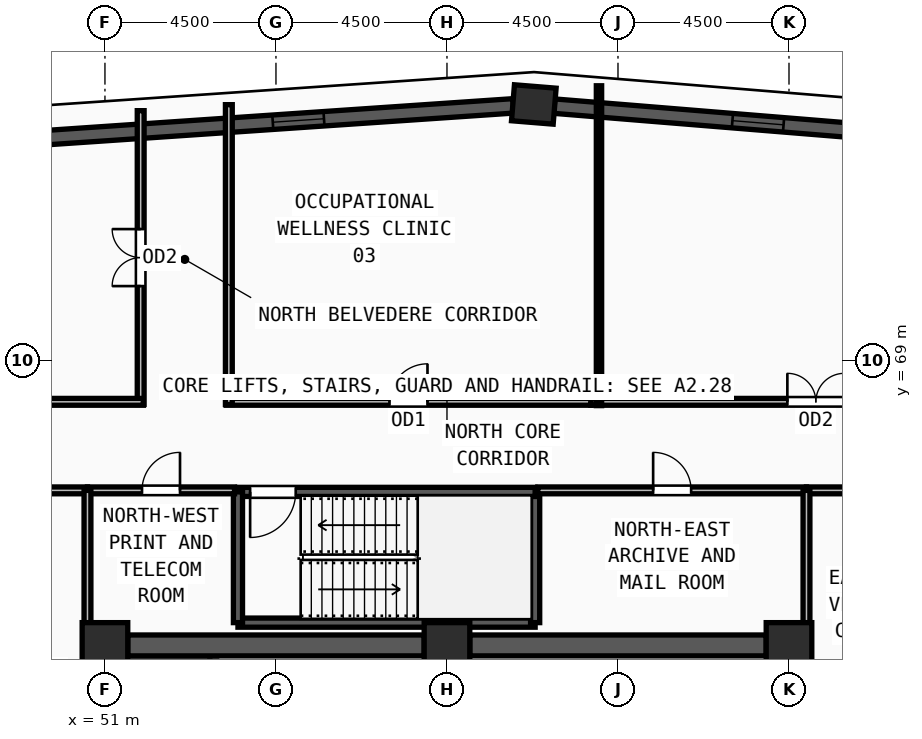
"""IFC4 building model, lengths in metres.
Left out: names, types, materials, properties, quantities, classifications, styles, units other than length and angle.
Written with IfcOpenShell. Run it as: python <this file> out.ifc"""

import sys

from ifc_helpers import new_model, si_unit, direction, frame, frame_2d, origin, origin_2d, place, context, subcontext, project, spatial, rectangle, extrude, source, transform, mapped, element, fill, save


model = new_model("IFC4")
c1 = context("Model", 3, precision=1e-05, world=origin(), true_north=direction((0.0, 1.0)))
c2 = subcontext(c1, "Body", "Model", "MODEL_VIEW")
j1 = project(units=[si_unit("LENGTHUNIT", "METRE"), si_unit("PLANEANGLEUNIT", "RADIAN")], contexts=[c1])
p1 = place(None, origin())
s1 = spatial("IfcSite", under=j1, at=p1, CompositionType="ELEMENT")
p2 = place(p1, origin())
s2 = spatial("IfcBuilding", under=s1, at=p2, CompositionType="ELEMENT")
p3 = place(p2, frame((0.0, 0.0, 320.25)))
s3 = spatial("IfcBuildingStorey", under=s2, at=p3, CompositionType="ELEMENT", Elevation=320.25)
m1 = source(origin(), c2, "Body", "SweptSolid", [
    extrude(rectangle(XDim=1.2, YDim=1.2, at=origin_2d()), origin(), (0.0, 0.0, 1.0), 3.75),
])
for number, where, z_axis, x_axis in (
    (1, (69.0, 61.5, 0.0), (0.0, 0.0, 1.0), (1.0, 0.0, 0.0)),
    (2, (60.0, 61.5, 0.0), (0.0, 0.0, 1.0), (1.0, 0.0, 0.0)),
    (3, (51.0, 61.5, 0.0), (0.0, 0.0, 1.0), (1.0, 0.0, 0.0)),
):
    element("IfcColumn", number, at=place(p3, frame(where, z_axis=z_axis, x_axis=x_axis)), inside=s3, PredefinedType="COLUMN", context=c2, shape_type="MappedRepresentation", body=[
        mapped(m1, transform((0.0, 0.0, 0.0), x_axis=(1.0, 0.0, 0.0), y_axis=(0.0, 1.0, 0.0), z_axis=(0.0, 0.0, 1.0), scale=1.0)),
    ])
m2 = source(origin(), c2, "Body", "SweptSolid", [
    extrude(rectangle(XDim=1.1, YDim=0.95, at=origin_2d()), origin(), (0.0, 0.0, 1.0), 3.75),
])
p4 = place(p3, frame((62.285, 75.734, 0.0), z_axis=(0.0, 0.0, 1.0), x_axis=(-0.996694347809, 0.081242704565, 0.0)))
e4 = element("IfcColumn", 4, at=p4, inside=s3, PredefinedType="COLUMN", context=c2, shape_type="MappedRepresentation", body=[
    mapped(m2, transform((0.0, 0.0, 0.0), x_axis=(1.0, 0.0, 0.0), y_axis=(0.0, 1.0, 0.0), z_axis=(0.0, 0.0, 1.0), scale=1.0)),
])
p5 = place(p3, frame((84.267, 73.943, 0.0), z_axis=(0.0, 0.0, 1.0), x_axis=(-0.996698591672, 0.081190623594, 0.0)))
e5 = element("IfcWall", 5, at=p5, inside=s3, PredefinedType="SOLIDWALL", context=c2, shape_type="SweptSolid", body=[
    extrude(rectangle(XDim=21.515, YDim=0.38, at=frame_2d((10.758, 0.0))), origin(), (0.0, 0.0, 1.0), 3.47),
])
m3 = source(origin(), c2, "Body", "SweptSolid", [
    extrude(rectangle(XDim=1.35, YDim=1.85, at=frame_2d((0.675, 0.925))), frame((0.0, 0.2, 0.0), z_axis=(0.0, -1.0, 0.0), x_axis=(1.0, 0.0, 0.0)), (0.0, 0.0, 1.0), 0.4),
])
p6 = place(p5, frame((4.704, 0.0, 0.55)))
e6 = element("IfcOpeningElement", 6, at=p6, cuts=e5, PredefinedType="OPENING", context=c2, shape_type="MappedRepresentation", body=[
    mapped(m3, transform((0.0, 0.0, 0.0), x_axis=(1.0, 0.0, 0.0), y_axis=(0.0, 1.0, 0.0), z_axis=(0.0, 0.0, 1.0), scale=1.0)),
])
p7 = place(p5, frame((10.083, 0.0, 0.55)))
e7 = element("IfcOpeningElement", 7, at=p7, cuts=e5, PredefinedType="OPENING", context=c2, shape_type="MappedRepresentation", body=[
    mapped(m3, transform((0.0, 0.0, 0.0), x_axis=(1.0, 0.0, 0.0), y_axis=(0.0, 1.0, 0.0), z_axis=(0.0, 0.0, 1.0), scale=1.0)),
])
p8 = place(p5, frame((15.461, 0.0, 0.55)))
e8 = element("IfcOpeningElement", 8, at=p8, cuts=e5, PredefinedType="OPENING", context=c2, shape_type="MappedRepresentation", body=[
    mapped(m3, transform((0.0, 0.0, 0.0), x_axis=(1.0, 0.0, 0.0), y_axis=(0.0, 1.0, 0.0), z_axis=(0.0, 0.0, 1.0), scale=1.0)),
])
p9 = place(p3, frame((61.746, 75.697, 0.0), z_axis=(0.0, 0.0, 1.0), x_axis=(-0.997695779362, -0.067846384155, 0.0)))
e9 = element("IfcWall", 9, at=p9, inside=s3, PredefinedType="SOLIDWALL", context=c2, shape_type="SweptSolid", body=[
    extrude(rectangle(XDim=26.074, YDim=0.38, at=frame_2d((13.037, 0.0))), origin(), (0.0, 0.0, 1.0), 3.47),
])
p10 = place(p9, frame((4.994, 0.0, 0.55)))
e10 = element("IfcOpeningElement", 10, at=p10, cuts=e9, PredefinedType="OPENING", context=c2, shape_type="MappedRepresentation", body=[
    mapped(m3, transform((0.0, 0.0, 0.0), x_axis=(1.0, 0.0, 0.0), y_axis=(0.0, 1.0, 0.0), z_axis=(0.0, 0.0, 1.0), scale=1.0)),
])
p11 = place(p9, frame((12.362, 0.0, 0.55)))
e11 = element("IfcOpeningElement", 11, at=p11, cuts=e9, PredefinedType="OPENING", context=c2, shape_type="MappedRepresentation", body=[
    mapped(m3, transform((0.0, 0.0, 0.0), x_axis=(1.0, 0.0, 0.0), y_axis=(0.0, 1.0, 0.0), z_axis=(0.0, 0.0, 1.0), scale=1.0)),
])
p12 = place(p9, frame((18.881, 0.0, 0.55)))
e12 = element("IfcOpeningElement", 12, at=p12, cuts=e9, PredefinedType="OPENING", context=c2, shape_type="MappedRepresentation", body=[
    mapped(m3, transform((0.0, 0.0, 0.0), x_axis=(1.0, 0.0, 0.0), y_axis=(0.0, 1.0, 0.0), z_axis=(0.0, 0.0, 1.0), scale=1.0)),
])
for number, where, z_axis, x_axis in (
    (13, (51.6, 61.5, 0.0), (0.0, 0.0, 1.0), (1.0, 0.0, 0.0)),
    (14, (60.6, 61.5, 0.0), (0.0, 0.0, 1.0), (1.0, 0.0, 0.0)),
):
    element("IfcWall", number, at=place(p3, frame(where, z_axis=z_axis, x_axis=x_axis)), inside=s3, PredefinedType="SHEAR", context=c2, shape_type="SweptSolid", body=[
        extrude(rectangle(XDim=7.8, YDim=0.55, at=frame_2d((3.9, 0.0))), origin(), (0.0, 0.0, 1.0), 3.47),
    ])
p13 = place(p3, frame((54.5, 62.1, 0.0), z_axis=(0.0, 0.0, 1.0), x_axis=(1.0, 0.0, 0.0)))
e15 = element("IfcWall", 15, at=p13, inside=s3, PredefinedType="SOLIDWALL", context=c2, shape_type="SweptSolid", body=[
    extrude(rectangle(XDim=7.82, YDim=0.24, at=frame_2d((3.91, 0.0))), origin(), (0.0, 0.0, 1.0), 3.47),
])
p14 = place(p3, frame((62.32, 62.1, 0.0), z_axis=(0.0, 0.0, 1.0), x_axis=(0.0, 1.0, 0.0)))
e16 = element("IfcWall", 16, at=p14, inside=s3, PredefinedType="SOLIDWALL", context=c2, shape_type="SweptSolid", body=[
    extrude(rectangle(XDim=3.44, YDim=0.24, at=frame_2d((1.72, 0.0))), origin(), (0.0, 0.0, 1.0), 3.47),
])
p15 = place(p3, frame((62.32, 65.54, 0.0), z_axis=(0.0, 0.0, 1.0), x_axis=(-1.0, 0.0, 0.0)))
e17 = element("IfcWall", 17, at=p15, inside=s3, PredefinedType="SOLIDWALL", context=c2, shape_type="SweptSolid", body=[
    extrude(rectangle(XDim=7.82, YDim=0.24, at=frame_2d((3.91, 0.0))), origin(), (0.0, 0.0, 1.0), 3.47),
])
m4 = source(origin(), c2, "Body", "SweptSolid", [
    extrude(rectangle(XDim=1.2, YDim=2.2, at=frame_2d((0.6, 1.1))), frame((0.0, 0.13, 0.0), z_axis=(0.0, -1.0, 0.0), x_axis=(1.0, 0.0, 0.0)), (0.0, 0.0, 1.0), 0.26),
])
p16 = place(p15, frame((6.3, 0.0, 0.0)))
e18 = element("IfcOpeningElement", 18, at=p16, cuts=e17, PredefinedType="OPENING", context=c2, shape_type="MappedRepresentation", body=[
    mapped(m4, transform((0.0, 0.0, 0.0), x_axis=(1.0, 0.0, 0.0), y_axis=(0.0, 1.0, 0.0), z_axis=(0.0, 0.0, 1.0), scale=1.0)),
])
p17 = place(p3, frame((54.5, 65.54, 0.0), z_axis=(0.0, 0.0, 1.0), x_axis=(0.0, -1.0, 0.0)))
e19 = element("IfcWall", 19, at=p17, inside=s3, PredefinedType="SOLIDWALL", context=c2, shape_type="SweptSolid", body=[
    extrude(rectangle(XDim=3.44, YDim=0.24, at=frame_2d((1.72, 0.0))), origin(), (0.0, 0.0, 1.0), 3.47),
])
p18 = place(p3, frame((50.54, 65.58, 0.0), z_axis=(0.0, 0.0, 1.0), x_axis=(1.0, 0.0, 0.0)))
e20 = element("IfcWall", 20, at=p18, inside=s3, PredefinedType="PARTITIONING", context=c2, shape_type="SweptSolid", body=[
    extrude(rectangle(XDim=3.87, YDim=0.18, at=frame_2d((1.935, 0.0))), origin(), (0.0, 0.0, 1.0), 3.47),
])
m5 = source(origin(), c2, "Body", "SweptSolid", [
    extrude(rectangle(XDim=1.0, YDim=2.2, at=frame_2d((0.5, 1.1))), frame((0.0, 0.1, 0.0), z_axis=(0.0, -1.0, 0.0), x_axis=(1.0, 0.0, 0.0)), (0.0, 0.0, 1.0), 0.2),
])
p19 = place(p18, frame((1.435, 0.0, 0.0)))
e21 = element("IfcOpeningElement", 21, at=p19, cuts=e20, PredefinedType="OPENING", context=c2, shape_type="MappedRepresentation", body=[
    mapped(m5, transform((0.0, 0.0, 0.0), x_axis=(1.0, 0.0, 0.0), y_axis=(0.0, 1.0, 0.0), z_axis=(0.0, 0.0, 1.0), scale=1.0)),
])
p20 = place(p3, frame((62.39, 65.58, 0.0), z_axis=(0.0, 0.0, 1.0), x_axis=(1.0, 0.0, 0.0)))
e22 = element("IfcWall", 22, at=p20, inside=s3, PredefinedType="PARTITIONING", context=c2, shape_type="SweptSolid", body=[
    extrude(rectangle(XDim=7.07, YDim=0.18, at=frame_2d((3.535, 0.0))), origin(), (0.0, 0.0, 1.0), 3.47),
])
p21 = place(p20, frame((3.035, 0.0, 0.0)))
e23 = element("IfcOpeningElement", 23, at=p21, cuts=e22, PredefinedType="OPENING", context=c2, shape_type="MappedRepresentation", body=[
    mapped(m5, transform((0.0, 0.0, 0.0), x_axis=(1.0, 0.0, 0.0), y_axis=(0.0, 1.0, 0.0), z_axis=(0.0, 0.0, 1.0), scale=1.0)),
])
p22 = place(p3, frame((46.7, 65.58, 0.0), z_axis=(0.0, 0.0, 1.0), x_axis=(1.0, 0.0, 0.0)))
e24 = element("IfcWall", 24, at=p22, inside=s3, PredefinedType="PARTITIONING", context=c2, shape_type="SweptSolid", body=[
    extrude(rectangle(XDim=3.84, YDim=0.18, at=frame_2d((1.92, 0.0))), origin(), (0.0, 0.0, 1.0), 3.47),
])
m6 = source(origin(), c2, "Body", "SweptSolid", [
    extrude(rectangle(XDim=1.3, YDim=2.2, at=frame_2d((0.65, 1.1))), frame((0.0, 0.1, 0.0), z_axis=(0.0, -1.0, 0.0), x_axis=(1.0, 0.0, 0.0)), (0.0, 0.0, 1.0), 0.2),
])
p23 = place(p22, frame((1.27, 0.0, 0.0)))
e25 = element("IfcOpeningElement", 25, at=p23, cuts=e24, PredefinedType="OPENING", context=c2, shape_type="MappedRepresentation", body=[
    mapped(m6, transform((0.0, 0.0, 0.0), x_axis=(1.0, 0.0, 0.0), y_axis=(0.0, 1.0, 0.0), z_axis=(0.0, 0.0, 1.0), scale=1.0)),
])
p24 = place(p3, frame((69.46, 65.58, 0.0), z_axis=(0.0, 0.0, 1.0), x_axis=(1.0, 0.0, 0.0)))
e26 = element("IfcWall", 26, at=p24, inside=s3, PredefinedType="PARTITIONING", context=c2, shape_type="SweptSolid", body=[
    extrude(rectangle(XDim=3.84, YDim=0.18, at=frame_2d((1.92, 0.0))), origin(), (0.0, 0.0, 1.0), 3.47),
])
p25 = place(p24, frame((1.27, 0.0, 0.0)))
e27 = element("IfcOpeningElement", 27, at=p25, cuts=e26, PredefinedType="OPENING", context=c2, shape_type="MappedRepresentation", body=[
    mapped(m6, transform((0.0, 0.0, 0.0), x_axis=(1.0, 0.0, 0.0), y_axis=(0.0, 1.0, 0.0), z_axis=(0.0, 0.0, 1.0), scale=1.0)),
])
p26 = place(p3, frame((63.785, 67.91, 0.0), z_axis=(0.0, 0.0, 1.0), x_axis=(1.0, 0.0, 0.0)))
e28 = element("IfcWall", 28, at=p26, inside=s3, PredefinedType="PARTITIONING", context=c2, shape_type="SweptSolid", body=[
    extrude(rectangle(XDim=11.845, YDim=0.18, at=frame_2d((5.922, 0.0))), origin(), (0.0, 0.0, 1.0), 3.47),
])
m7 = source(origin(), c2, "Body", "SweptSolid", [
    extrude(rectangle(XDim=1.5, YDim=2.2, at=frame_2d((0.75, 1.1))), frame((0.0, 0.1, 0.0), z_axis=(0.0, -1.0, 0.0), x_axis=(1.0, 0.0, 0.0)), (0.0, 0.0, 1.0), 0.2),
])
p27 = place(p26, frame((5.172, 0.0, 0.0)))
e29 = element("IfcOpeningElement", 29, at=p27, cuts=e28, PredefinedType="OPENING", context=c2, shape_type="MappedRepresentation", body=[
    mapped(m7, transform((0.0, 0.0, 0.0), x_axis=(1.0, 0.0, 0.0), y_axis=(0.0, 1.0, 0.0), z_axis=(0.0, 0.0, 1.0), scale=1.0)),
])
p28 = place(p3, frame((54.19, 67.91, 0.0), z_axis=(0.0, 0.0, 1.0), x_axis=(1.0, 0.0, 0.0)))
e30 = element("IfcWall", 30, at=p28, inside=s3, PredefinedType="PARTITIONING", context=c2, shape_type="SweptSolid", body=[
    extrude(rectangle(XDim=9.595, YDim=0.18, at=frame_2d((4.797, 0.0))), origin(), (0.0, 0.0, 1.0), 3.47),
])
p29 = place(p28, frame((4.297, 0.0, 0.0)))
e31 = element("IfcOpeningElement", 31, at=p29, cuts=e30, PredefinedType="OPENING", context=c2, shape_type="MappedRepresentation", body=[
    mapped(m5, transform((0.0, 0.0, 0.0), x_axis=(1.0, 0.0, 0.0), y_axis=(0.0, 1.0, 0.0), z_axis=(0.0, 0.0, 1.0), scale=1.0)),
])
p30 = place(p3, frame((51.94, 67.84, 0.0), z_axis=(0.0, 0.0, 1.0), x_axis=(0.0, 1.0, 0.0)))
e32 = element("IfcWall", 32, at=p30, inside=s3, PredefinedType="PARTITIONING", context=c2, shape_type="SweptSolid", body=[
    extrude(rectangle(XDim=7.731, YDim=0.18, at=frame_2d((3.865, 0.0))), origin(), (0.0, 0.0, 1.0), 3.47),
])
p31 = place(p30, frame((3.115, 0.0, 0.0)))
e33 = element("IfcOpeningElement", 33, at=p31, cuts=e32, PredefinedType="OPENING", context=c2, shape_type="MappedRepresentation", body=[
    mapped(m7, transform((0.0, 0.0, 0.0), x_axis=(1.0, 0.0, 0.0), y_axis=(0.0, 1.0, 0.0), z_axis=(0.0, 0.0, 1.0), scale=1.0)),
])
for number, where, z_axis, x_axis in (
    (34, (50.54, 61.95, 0.0), (0.0, 0.0, 1.0), (0.0, 1.0, 0.0)),
    (35, (69.46, 61.95, 0.0), (0.0, 0.0, 1.0), (0.0, 1.0, 0.0)),
):
    element("IfcWall", number, at=place(p3, frame(where, z_axis=z_axis, x_axis=x_axis)), inside=s3, PredefinedType="PARTITIONING", context=c2, shape_type="SweptSolid", body=[
        extrude(rectangle(XDim=3.63, YDim=0.18, at=frame_2d((1.815, 0.0))), origin(), (0.0, 0.0, 1.0), 3.47),
    ])
p32 = place(p3, frame((54.26, 75.729, 0.0), z_axis=(0.0, 0.0, 1.0), x_axis=(0.0, -1.0, 0.0)))
e36 = element("IfcWall", 36, at=p32, inside=s3, PredefinedType="PARTITIONING", context=c2, shape_type="SweptSolid", body=[
    extrude(rectangle(XDim=7.889, YDim=0.18, at=frame_2d((3.944, 0.0))), origin(), (0.0, 0.0, 1.0), 3.47),
])
p33 = place(p3, frame((44.37, 67.91, 0.0), z_axis=(0.0, 0.0, 1.0), x_axis=(1.0, 0.0, 0.0)))
e37 = element("IfcWall", 37, at=p33, inside=s3, PredefinedType="PARTITIONING", context=c2, shape_type="SweptSolid", body=[
    extrude(rectangle(XDim=7.64, YDim=0.18, at=frame_2d((3.82, 0.0))), origin(), (0.0, 0.0, 1.0), 3.47),
])
p34 = place(p3, frame((64.0, 67.81, 0.0), z_axis=(0.0, 0.0, 1.0), x_axis=(0.0, 1.0, 0.0)))
e38 = element("IfcWall", 38, at=p34, inside=s3, PredefinedType="PARTITIONING", context=c2, shape_type="SweptSolid", body=[
    extrude(rectangle(XDim=8.416, YDim=0.14, at=frame_2d((4.208, 0.0))), origin(), (0.0, 0.0, 1.0), 3.47),
])
m8 = source(origin(), c2, "Body", "SweptSolid", [
    extrude(rectangle(XDim=1.35, YDim=1.85, at=frame_2d((0.675, 0.925))), frame((0.0, 0.03, 0.0), z_axis=(0.0, -1.0, 0.0), x_axis=(1.0, 0.0, 0.0)), (0.0, 0.0, 1.0), 0.06),
])
p35 = place(p8, origin())
e39 = element("IfcWindow", 39, at=p35, inside=s3, PartitioningType="SINGLE_PANEL", PredefinedType="WINDOW", context=c2, shape_type="MappedRepresentation", body=[
    mapped(m8, transform((0.0, 0.0, 0.0), x_axis=(1.0, 0.0, 0.0), y_axis=(0.0, 1.0, 0.0), z_axis=(0.0, 0.0, 1.0), scale=1.0)),
])
fill(e8, e39)
p36 = place(p10, origin())
e40 = element("IfcWindow", 40, at=p36, inside=s3, PartitioningType="SINGLE_PANEL", PredefinedType="WINDOW", context=c2, shape_type="MappedRepresentation", body=[
    mapped(m8, transform((0.0, 0.0, 0.0), x_axis=(1.0, 0.0, 0.0), y_axis=(0.0, 1.0, 0.0), z_axis=(0.0, 0.0, 1.0), scale=1.0)),
])
fill(e10, e40)
m9 = source(origin(), c2, "Body", "SweptSolid", [
    extrude(rectangle(XDim=1.2, YDim=2.2, at=frame_2d((0.6, 1.1))), frame((0.0, 0.025, 0.0), z_axis=(0.0, -1.0, 0.0), x_axis=(1.0, 0.0, 0.0)), (0.0, 0.0, 1.0), 0.05),
])
p37 = place(p16, origin())
e41 = element("IfcDoor", 41, at=p37, inside=s3, OperationType="SINGLE_SWING_RIGHT", PredefinedType="DOOR", context=c2, shape_type="MappedRepresentation", body=[
    mapped(m9, transform((0.0, 0.0, 0.0), x_axis=(1.0, 0.0, 0.0), y_axis=(0.0, 1.0, 0.0), z_axis=(0.0, 0.0, 1.0), scale=1.0)),
])
fill(e18, e41)
m10 = source(origin(), c2, "Body", "SweptSolid", [
    extrude(rectangle(XDim=1.0, YDim=2.2, at=frame_2d((0.5, 1.1))), frame((0.0, 0.025, 0.0), z_axis=(0.0, -1.0, 0.0), x_axis=(1.0, 0.0, 0.0)), (0.0, 0.0, 1.0), 0.05),
])
p38 = place(p19, origin())
e42 = element("IfcDoor", 42, at=p38, inside=s3, OperationType="SINGLE_SWING_RIGHT", PredefinedType="DOOR", context=c2, shape_type="MappedRepresentation", body=[
    mapped(m10, transform((0.0, 0.0, 0.0), x_axis=(1.0, 0.0, 0.0), y_axis=(0.0, 1.0, 0.0), z_axis=(0.0, 0.0, 1.0), scale=1.0)),
])
fill(e21, e42)
p39 = place(p21, origin())
e43 = element("IfcDoor", 43, at=p39, inside=s3, OperationType="SINGLE_SWING_LEFT", PredefinedType="DOOR", context=c2, shape_type="MappedRepresentation", body=[
    mapped(m10, transform((0.0, 0.0, 0.0), x_axis=(1.0, 0.0, 0.0), y_axis=(0.0, 1.0, 0.0), z_axis=(0.0, 0.0, 1.0), scale=1.0)),
])
fill(e23, e43)
m11 = source(origin(), c2, "Body", "SweptSolid", [
    extrude(rectangle(XDim=1.5, YDim=2.2, at=frame_2d((0.75, 1.1))), frame((0.0, 0.025, 0.0), z_axis=(0.0, -1.0, 0.0), x_axis=(1.0, 0.0, 0.0)), (0.0, 0.0, 1.0), 0.05),
])
p40 = place(p27, origin())
e44 = element("IfcDoor", 44, at=p40, inside=s3, OperationType="DOUBLE_DOOR_SINGLE_SWING", PredefinedType="DOOR", context=c2, shape_type="MappedRepresentation", body=[
    mapped(m11, transform((0.0, 0.0, 0.0), x_axis=(1.0, 0.0, 0.0), y_axis=(0.0, 1.0, 0.0), z_axis=(0.0, 0.0, 1.0), scale=1.0)),
])
fill(e29, e44)
p41 = place(p29, origin())
e45 = element("IfcDoor", 45, at=p41, inside=s3, OperationType="SINGLE_SWING_RIGHT", PredefinedType="DOOR", context=c2, shape_type="MappedRepresentation", body=[
    mapped(m10, transform((0.0, 0.0, 0.0), x_axis=(1.0, 0.0, 0.0), y_axis=(0.0, 1.0, 0.0), z_axis=(0.0, 0.0, 1.0), scale=1.0)),
])
fill(e31, e45)
p42 = place(p31, origin())
e46 = element("IfcDoor", 46, at=p42, inside=s3, OperationType="DOUBLE_DOOR_SINGLE_SWING", PredefinedType="DOOR", context=c2, shape_type="MappedRepresentation", body=[
    mapped(m11, transform((0.0, 0.0, 0.0), x_axis=(1.0, 0.0, 0.0), y_axis=(0.0, 1.0, 0.0), z_axis=(0.0, 0.0, 1.0), scale=1.0)),
])
fill(e33, e46)
save(model, sys.argv[1])
